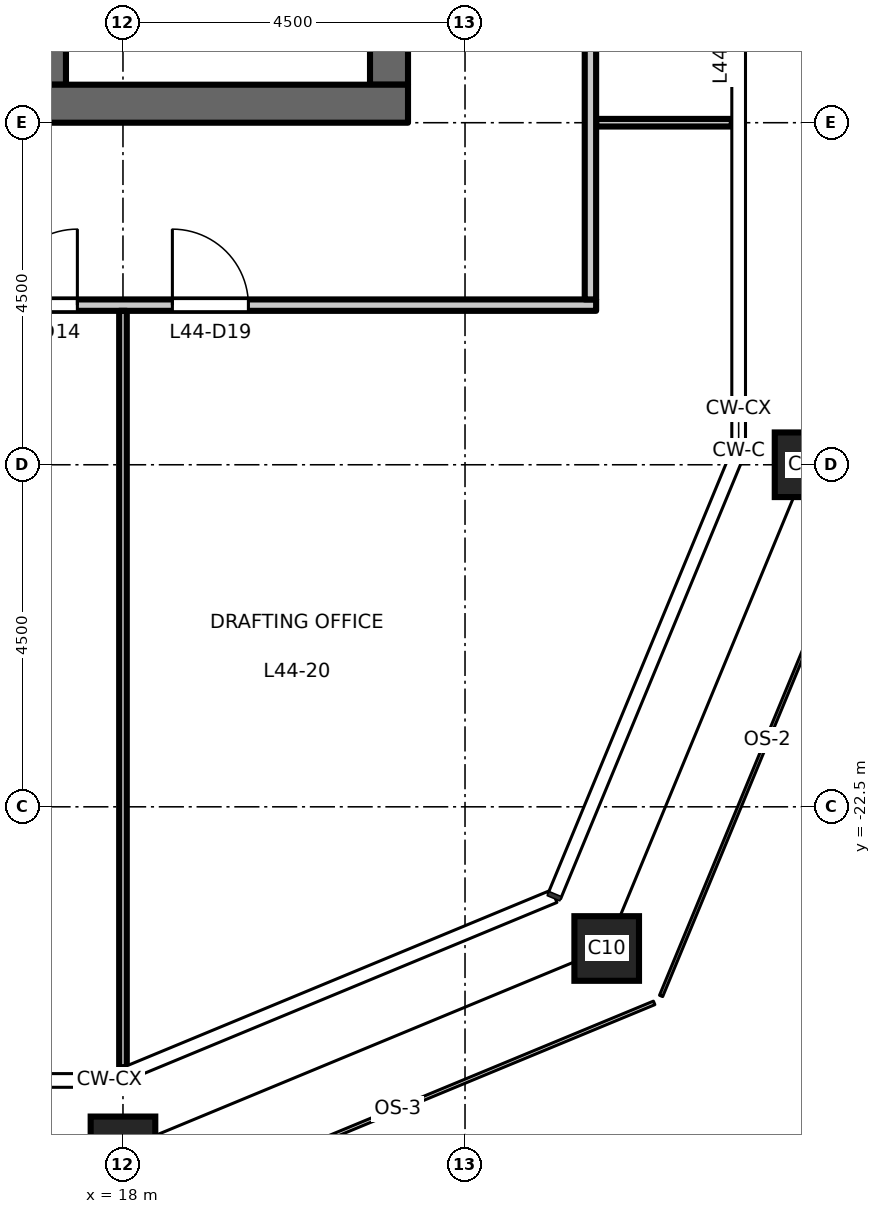
"""IFC4 building model, lengths in metres.
Left out: names, types, materials, properties, quantities, classifications, styles, units other than length and angle.
Written with IfcOpenShell. Run it as: python <this file> out.ifc"""

import sys

from ifc_helpers import new_model, si_unit, direction, frame, frame_2d, origin, origin_2d, place, context, subcontext, project, spatial, rectangle, hollow_rectangle, extrude, element, fill, save


model = new_model("IFC4")
c1 = context("Model", 3, precision=1e-05, world=origin(), true_north=direction((0.0, 1.0)))
c2 = subcontext(c1, "Body", "Model", "MODEL_VIEW")
j1 = project(units=[si_unit("LENGTHUNIT", "METRE"), si_unit("PLANEANGLEUNIT", "RADIAN")], contexts=[c1])
p1 = place(None, origin())
s1 = spatial("IfcSite", under=j1, at=p1, CompositionType="ELEMENT")
p2 = place(p1, origin())
s2 = spatial("IfcBuilding", under=s1, at=p2, CompositionType="ELEMENT")
p3 = place(p2, frame((0.0, 0.0, 206.2)))
s3 = spatial("IfcBuildingStorey", under=s2, at=p3, CompositionType="ELEMENT", Elevation=206.2)
for number, where, z_axis, x_axis in (
    (1, (18.0, -27.0, 0.0), (0.0, 0.0, 1.0), (1.0, 0.0, 0.0)),
    (2, (24.364, -24.364, 0.0), (0.0, 0.0, 1.0), (1.0, 0.0, 0.0)),
    (3, (27.0, -18.0, 0.0), (0.0, 0.0, 1.0), (1.0, 0.0, 0.0)),
):
    element("IfcColumn", number, at=place(p3, frame(where, z_axis=z_axis, x_axis=x_axis)), inside=s3, PredefinedType="COLUMN", context=c2, shape_type="SweptSolid", body=[
        extrude(hollow_rectangle(XDim=0.85, YDim=0.85, WallThickness=0.05, at=origin_2d()), origin(), (0.0, 0.0, 1.0), 4.5),
    ])
p4 = place(p3, frame((21.5, -13.0, 0.0), z_axis=(0.0, 0.0, 1.0), x_axis=(0.0, 1.0, 0.0)))
e4 = element("IfcWall", 4, at=p4, inside=s3, PredefinedType="SHEAR", context=c2, shape_type="SweptSolid", body=[
    extrude(rectangle(XDim=26.0, YDim=0.5, at=frame_2d((13.0, 0.0))), origin(), (0.0, 0.0, 1.0), 4.35),
])
p5 = place(p4, frame((16.825, 0.0, 0.0)))
e5 = element("IfcOpeningElement", 5, at=p5, cuts=e4, PredefinedType="OPENING", context=c2, shape_type="SweptSolid", body=[
    extrude(rectangle(XDim=1.8, YDim=2.1, at=frame_2d((0.9, 1.05))), frame((0.0, 0.26, 0.0), z_axis=(0.0, -1.0, 0.0), x_axis=(1.0, 0.0, 0.0)), (0.0, 0.0, 1.0), 0.52),
])
p6 = place(p4, frame((7.375, 0.0, 0.0)))
e6 = element("IfcOpeningElement", 6, at=p6, cuts=e4, PredefinedType="OPENING", context=c2, shape_type="SweptSolid", body=[
    extrude(rectangle(XDim=1.8, YDim=2.1, at=frame_2d((0.9, 1.05))), frame((0.0, 0.26, 0.0), z_axis=(0.0, -1.0, 0.0), x_axis=(1.0, 0.0, 0.0)), (0.0, 0.0, 1.0), 0.52),
])
p7 = place(p3, frame((17.0, -13.0, 0.0), z_axis=(0.0, 0.0, 1.0), x_axis=(0.0, 1.0, 0.0)))
e7 = element("IfcWall", 7, at=p7, inside=s3, PredefinedType="SHEAR", context=c2, shape_type="SweptSolid", body=[
    extrude(rectangle(XDim=6.575, YDim=0.5, at=frame_2d((3.288, 0.0))), origin(), (0.0, 0.0, 1.0), 4.35),
])
p8 = place(p3, frame((8.25, -13.25, 0.0), z_axis=(0.0, 0.0, 1.0), x_axis=(1.0, 0.0, 0.0)))
e8 = element("IfcWall", 8, at=p8, inside=s3, PredefinedType="SHEAR", context=c2, shape_type="SweptSolid", body=[
    extrude(rectangle(XDim=13.5, YDim=0.5, at=frame_2d((6.75, 0.0))), origin(), (0.0, 0.0, 1.0), 4.35),
])
p9 = place(p3, frame((-24.225, -15.9, 0.0), z_axis=(0.0, 0.0, 1.0), x_axis=(1.0, 0.0, 0.0)))
e9 = element("IfcWall", 9, at=p9, inside=s3, PredefinedType="PARTITIONING", context=c2, shape_type="SweptSolid", body=[
    extrude(rectangle(XDim=48.45, YDim=0.15, at=frame_2d((24.225, 0.0))), origin(), (0.0, 0.0, 1.0), 4.35),
])
p10 = place(p9, frame((6.875, 0.0, 0.0)))
e10 = element("IfcOpeningElement", 10, at=p10, cuts=e9, PredefinedType="OPENING", context=c2, shape_type="SweptSolid", body=[
    extrude(rectangle(XDim=1.0, YDim=2.1, at=frame_2d((0.5, 1.05))), frame((0.0, 0.085, 0.0), z_axis=(0.0, -1.0, 0.0), x_axis=(1.0, 0.0, 0.0)), (0.0, 0.0, 1.0), 0.17),
])
p11 = place(p9, frame((15.875, 0.0, 0.0)))
e11 = element("IfcOpeningElement", 11, at=p11, cuts=e9, PredefinedType="OPENING", context=c2, shape_type="SweptSolid", body=[
    extrude(rectangle(XDim=1.0, YDim=2.1, at=frame_2d((0.5, 1.05))), frame((0.0, 0.085, 0.0), z_axis=(0.0, -1.0, 0.0), x_axis=(1.0, 0.0, 0.0)), (0.0, 0.0, 1.0), 0.17),
])
p12 = place(p9, frame((24.875, 0.0, 0.0)))
e12 = element("IfcOpeningElement", 12, at=p12, cuts=e9, PredefinedType="OPENING", context=c2, shape_type="SweptSolid", body=[
    extrude(rectangle(XDim=1.0, YDim=2.1, at=frame_2d((0.5, 1.05))), frame((0.0, 0.085, 0.0), z_axis=(0.0, -1.0, 0.0), x_axis=(1.0, 0.0, 0.0)), (0.0, 0.0, 1.0), 0.17),
])
p13 = place(p9, frame((40.625, 0.0, 0.0)))
e13 = element("IfcOpeningElement", 13, at=p13, cuts=e9, PredefinedType="OPENING", context=c2, shape_type="SweptSolid", body=[
    extrude(rectangle(XDim=1.0, YDim=2.1, at=frame_2d((0.5, 1.05))), frame((0.0, 0.085, 0.0), z_axis=(0.0, -1.0, 0.0), x_axis=(1.0, 0.0, 0.0)), (0.0, 0.0, 1.0), 0.17),
])
p14 = place(p9, frame((42.875, 0.0, 0.0)))
e14 = element("IfcOpeningElement", 14, at=p14, cuts=e9, PredefinedType="OPENING", context=c2, shape_type="SweptSolid", body=[
    extrude(rectangle(XDim=1.0, YDim=2.1, at=frame_2d((0.5, 1.05))), frame((0.0, 0.085, 0.0), z_axis=(0.0, -1.0, 0.0), x_axis=(1.0, 0.0, 0.0)), (0.0, 0.0, 1.0), 0.17),
])
p15 = place(p3, frame((24.225, -13.5, 0.0), z_axis=(0.0, 0.0, 1.0), x_axis=(1.0, 0.0, 0.0)))
e15 = element("IfcWall", 15, at=p15, inside=s3, PredefinedType="PARTITIONING", context=c2, shape_type="SweptSolid", body=[
    extrude(rectangle(XDim=1.785, YDim=0.1, at=frame_2d((0.893, 0.0))), origin(), (0.0, 0.0, 1.0), 3.95),
])
p16 = place(p3, frame((18.0, -25.928, 0.0), z_axis=(0.0, 0.0, 1.0), x_axis=(0.0, 1.0, 0.0)))
e16 = element("IfcWall", 16, at=p16, inside=s3, PredefinedType="PARTITIONING", context=c2, shape_type="SweptSolid", body=[
    extrude(rectangle(XDim=9.953, YDim=0.1, at=frame_2d((4.977, 0.0))), origin(), (0.0, 0.0, 1.0), 3.65),
])
p17 = place(p3, frame((24.15, -15.825, 0.0), z_axis=(0.0, 0.0, 1.0), x_axis=(0.0, 1.0, 0.0)))
e17 = element("IfcWall", 17, at=p17, inside=s3, PredefinedType="PARTITIONING", context=c2, shape_type="SweptSolid", body=[
    extrude(rectangle(XDim=31.65, YDim=0.15, at=frame_2d((15.825, 0.0))), origin(), (0.0, 0.0, 1.0), 4.35),
])
p18 = place(p17, frame((5.225, 0.0, 0.0)))
e18 = element("IfcOpeningElement", 18, at=p18, cuts=e17, PredefinedType="OPENING", context=c2, shape_type="SweptSolid", body=[
    extrude(rectangle(XDim=1.0, YDim=2.1, at=frame_2d((0.5, 1.05))), frame((0.0, 0.085, 0.0), z_axis=(0.0, -1.0, 0.0), x_axis=(1.0, 0.0, 0.0)), (0.0, 0.0, 1.0), 0.17),
])
p19 = place(p17, frame((7.475, 0.0, 0.0)))
e19 = element("IfcOpeningElement", 19, at=p19, cuts=e17, PredefinedType="OPENING", context=c2, shape_type="SweptSolid", body=[
    extrude(rectangle(XDim=1.0, YDim=2.1, at=frame_2d((0.5, 1.05))), frame((0.0, 0.085, 0.0), z_axis=(0.0, -1.0, 0.0), x_axis=(1.0, 0.0, 0.0)), (0.0, 0.0, 1.0), 0.17),
])
p20 = place(p17, frame((23.225, 0.0, 0.0)))
e20 = element("IfcOpeningElement", 20, at=p20, cuts=e17, PredefinedType="OPENING", context=c2, shape_type="SweptSolid", body=[
    extrude(rectangle(XDim=1.0, YDim=2.1, at=frame_2d((0.5, 1.05))), frame((0.0, 0.085, 0.0), z_axis=(0.0, -1.0, 0.0), x_axis=(1.0, 0.0, 0.0)), (0.0, 0.0, 1.0), 0.17),
])
p21 = place(p17, frame((25.475, 0.0, 0.0)))
e21 = element("IfcOpeningElement", 21, at=p21, cuts=e17, PredefinedType="OPENING", context=c2, shape_type="SweptSolid", body=[
    extrude(rectangle(XDim=1.0, YDim=2.1, at=frame_2d((0.5, 1.05))), frame((0.0, 0.085, 0.0), z_axis=(0.0, -1.0, 0.0), x_axis=(1.0, 0.0, 0.0)), (0.0, 0.0, 1.0), 0.17),
])
p22 = place(p13, origin())
e22 = element("IfcDoor", 22, at=p22, inside=s3, OperationType="SINGLE_SWING_RIGHT", PredefinedType="DOOR", context=c2, shape_type="SweptSolid", body=[
    extrude(rectangle(XDim=1.0, YDim=2.1, at=frame_2d((0.5, 1.05))), frame((0.0, 0.025, 0.0), z_axis=(0.0, -1.0, 0.0), x_axis=(1.0, 0.0, 0.0)), (0.0, 0.0, 1.0), 0.05),
])
fill(e13, e22)
p23 = place(p14, origin())
e23 = element("IfcDoor", 23, at=p23, inside=s3, OperationType="SINGLE_SWING_LEFT", PredefinedType="DOOR", context=c2, shape_type="SweptSolid", body=[
    extrude(rectangle(XDim=1.0, YDim=2.1, at=frame_2d((0.5, 1.05))), frame((0.0, 0.025, 0.0), z_axis=(0.0, -1.0, 0.0), x_axis=(1.0, 0.0, 0.0)), (0.0, 0.0, 1.0), 0.05),
])
fill(e14, e23)
save(model, sys.argv[1])
